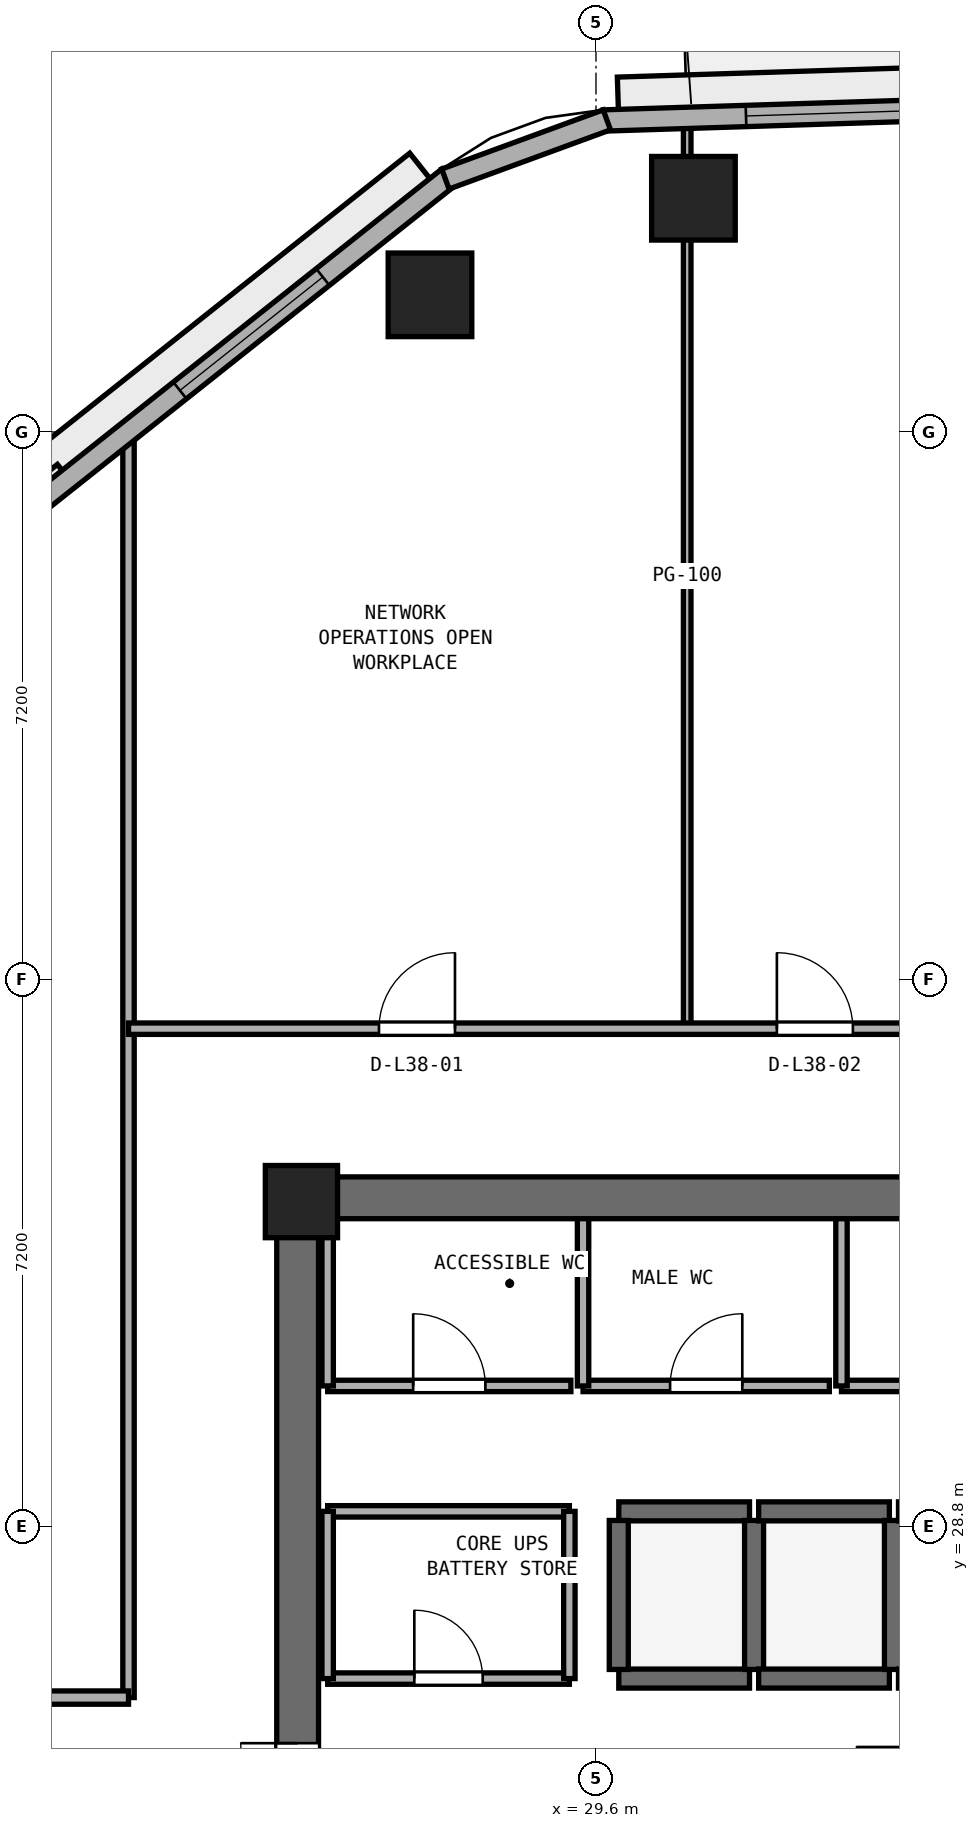
"""IFC4 building model, lengths in metres.
Left out: names, types, materials, properties, quantities, classifications, styles, units other than length and angle.
Written with IfcOpenShell. Run it as: python <this file> out.ifc"""

import sys

from ifc_helpers import new_model, si_unit, direction, frame, frame_2d, origin, origin_2d, place, context, subcontext, project, spatial, rectangle, extrude, element, fill, save


model = new_model("IFC4")
c1 = context("Model", 3, precision=1e-05, world=origin(), true_north=direction((0.0, 1.0)))
c2 = subcontext(c1, "Body", "Model", "MODEL_VIEW")
j1 = project(units=[si_unit("LENGTHUNIT", "METRE"), si_unit("PLANEANGLEUNIT", "RADIAN")], contexts=[c1])
p1 = place(None, origin())
s1 = spatial("IfcSite", under=j1, at=p1, CompositionType="ELEMENT")
p2 = place(p1, origin())
s2 = spatial("IfcBuilding", under=s1, at=p2, CompositionType="ELEMENT")
p3 = place(p2, frame((0.0, 0.0, 151.6)))
s3 = spatial("IfcBuildingStorey", under=s2, at=p3, CompositionType="ELEMENT", Elevation=151.6)
p4 = place(p3, frame((25.4, 33.125, 0.0), z_axis=(0.0, 0.0, 1.0), x_axis=(1.0, 0.0, 0.0)))
e1 = element("IfcWall", 1, at=p4, inside=s3, PredefinedType="SHEAR", context=c2, shape_type="SweptSolid", body=[
    extrude(rectangle(XDim=23.2, YDim=0.55, at=frame_2d((11.6, 0.0))), origin(), (0.0, 0.0, 1.0), 3.54),
])
p5 = place(p3, frame((25.675, 17.55, 0.0), z_axis=(0.0, 0.0, 1.0), x_axis=(0.0, 1.0, 0.0)))
e2 = element("IfcWall", 2, at=p5, inside=s3, PredefinedType="SHEAR", context=c2, shape_type="SweptSolid", body=[
    extrude(rectangle(XDim=15.3, YDim=0.55, at=frame_2d((7.65, 0.0))), origin(), (0.0, 0.0, 1.0), 3.54),
])
p6 = place(p5, frame((6.9, 0.0, 0.0)))
e3 = element("IfcOpeningElement", 3, at=p6, cuts=e2, PredefinedType="OPENING", context=c2, shape_type="SweptSolid", body=[
    extrude(rectangle(XDim=1.5, YDim=2.15, at=frame_2d((0.75, 1.075))), frame((0.0, 0.285, 0.0), z_axis=(0.0, -1.0, 0.0), x_axis=(1.0, 0.0, 0.0)), (0.0, 0.0, 1.0), 0.57),
])
p7 = place(p3, frame((25.725, 33.075, 0.0), z_axis=(0.0, 0.0, 1.0), x_axis=(1.0, 0.0, 0.0)))
e4 = element("IfcColumn", 4, at=p7, inside=s3, PredefinedType="PILASTER", context=c2, shape_type="SweptSolid", body=[
    extrude(rectangle(XDim=0.95, YDim=0.95, at=origin_2d()), origin(), (0.0, 0.0, 1.0), 3.8),
])
for number, where, z_axis, x_axis in (
    (5, (30.882, 46.275, 0.0), (0.0, 0.0, 1.0), (1.0, 0.0, 0.0)),
    (6, (27.416, 45.004, 0.0), (0.0, 0.0, 1.0), (1.0, 0.0, 0.0)),
):
    element("IfcColumn", number, at=place(p3, frame(where, z_axis=z_axis, x_axis=x_axis)), inside=s3, PredefinedType="COLUMN", context=c2, shape_type="SweptSolid", body=[
        extrude(rectangle(XDim=1.1, YDim=1.1, at=origin_2d()), origin(), (0.0, 0.0, 1.0), 3.8),
    ])
for number, where, z_axis, x_axis in (
    (7, (29.9, 26.8, 0.0), (0.0, 0.0, 1.0), (1.0, 0.0, 0.0)),
    (8, (29.9, 29.0, 0.0), (0.0, 0.0, 1.0), (1.0, 0.0, 0.0)),
):
    element("IfcWall", number, at=place(p3, frame(where, z_axis=z_axis, x_axis=x_axis)), inside=s3, PredefinedType="SHEAR", context=c2, shape_type="SweptSolid", body=[
        extrude(rectangle(XDim=1.72, YDim=0.25, at=frame_2d((0.86, 0.0))), origin(), (0.0, 0.0, 1.0), 3.54),
    ])
for number, where, z_axis, x_axis in (
    (9, (29.9, 26.92, 0.0), (0.0, 0.0, 1.0), (0.0, 1.0, 0.0)),
    (10, (31.68, 26.92, 0.0), (0.0, 0.0, 1.0), (0.0, 1.0, 0.0)),
):
    element("IfcWall", number, at=place(p3, frame(where, z_axis=z_axis, x_axis=x_axis)), inside=s3, PredefinedType="SHEAR", context=c2, shape_type="SweptSolid", body=[
        extrude(rectangle(XDim=1.96, YDim=0.25, at=frame_2d((0.98, 0.0))), origin(), (0.0, 0.0, 1.0), 3.54),
    ])
for number, where, z_axis, x_axis in (
    (11, (31.74, 26.8, 0.0), (0.0, 0.0, 1.0), (1.0, 0.0, 0.0)),
    (12, (31.74, 29.0, 0.0), (0.0, 0.0, 1.0), (1.0, 0.0, 0.0)),
):
    element("IfcWall", number, at=place(p3, frame(where, z_axis=z_axis, x_axis=x_axis)), inside=s3, PredefinedType="SHEAR", context=c2, shape_type="SweptSolid", body=[
        extrude(rectangle(XDim=1.72, YDim=0.25, at=frame_2d((0.86, 0.0))), origin(), (0.0, 0.0, 1.0), 3.54),
    ])
p8 = place(p3, frame((33.52, 26.92, 0.0), z_axis=(0.0, 0.0, 1.0), x_axis=(0.0, 1.0, 0.0)))
e13 = element("IfcWall", 13, at=p8, inside=s3, PredefinedType="SHEAR", context=c2, shape_type="SweptSolid", body=[
    extrude(rectangle(XDim=1.96, YDim=0.25, at=frame_2d((0.98, 0.0))), origin(), (0.0, 0.0, 1.0), 3.54),
])
for number, where, z_axis, x_axis in (
    (14, (33.58, 26.8, 0.0), (0.0, 0.0, 1.0), (1.0, 0.0, 0.0)),
    (15, (33.58, 29.0, 0.0), (0.0, 0.0, 1.0), (1.0, 0.0, 0.0)),
):
    element("IfcWall", number, at=place(p3, frame(where, z_axis=z_axis, x_axis=x_axis)), inside=s3, PredefinedType="SHEAR", context=c2, shape_type="SweptSolid", body=[
        extrude(rectangle(XDim=1.72, YDim=0.25, at=frame_2d((0.86, 0.0))), origin(), (0.0, 0.0, 1.0), 3.54),
    ])
p9 = place(p3, frame((26.07, 30.65, 0.0), z_axis=(0.0, 0.0, 1.0), x_axis=(1.0, 0.0, 0.0)))
e16 = element("IfcWall", 16, at=p9, inside=s3, PredefinedType="PARTITIONING", context=c2, shape_type="SweptSolid", body=[
    extrude(rectangle(XDim=3.2, YDim=0.15, at=frame_2d((1.6, 0.0))), origin(), (0.0, 0.0, 1.0), 3.54),
])
p10 = place(p9, frame((1.125, 0.0, 0.0)))
e17 = element("IfcOpeningElement", 17, at=p10, cuts=e16, PredefinedType="OPENING", context=c2, shape_type="SweptSolid", body=[
    extrude(rectangle(XDim=0.95, YDim=2.1, at=frame_2d((0.475, 1.05))), frame((0.0, 0.085, 0.0), z_axis=(0.0, -1.0, 0.0), x_axis=(1.0, 0.0, 0.0)), (0.0, 0.0, 1.0), 0.17),
])
p11 = place(p3, frame((26.07, 30.65, 0.0), z_axis=(0.0, 0.0, 1.0), x_axis=(0.0, 1.0, 0.0)))
e18 = element("IfcWall", 18, at=p11, inside=s3, PredefinedType="PARTITIONING", context=c2, shape_type="SweptSolid", body=[
    extrude(rectangle(XDim=2.2, YDim=0.15, at=frame_2d((1.1, 0.0))), origin(), (0.0, 0.0, 1.0), 2.64),
])
p12 = place(p3, frame((29.43, 30.65, 0.0), z_axis=(0.0, 0.0, 1.0), x_axis=(1.0, 0.0, 0.0)))
e19 = element("IfcWall", 19, at=p12, inside=s3, PredefinedType="PARTITIONING", context=c2, shape_type="SweptSolid", body=[
    extrude(rectangle(XDim=3.24, YDim=0.15, at=frame_2d((1.62, 0.0))), origin(), (0.0, 0.0, 1.0), 3.54),
])
p13 = place(p12, frame((1.145, 0.0, 0.0)))
e20 = element("IfcOpeningElement", 20, at=p13, cuts=e19, PredefinedType="OPENING", context=c2, shape_type="SweptSolid", body=[
    extrude(rectangle(XDim=0.95, YDim=2.1, at=frame_2d((0.475, 1.05))), frame((0.0, 0.085, 0.0), z_axis=(0.0, -1.0, 0.0), x_axis=(1.0, 0.0, 0.0)), (0.0, 0.0, 1.0), 0.17),
])
p14 = place(p3, frame((29.43, 30.65, 0.0), z_axis=(0.0, 0.0, 1.0), x_axis=(0.0, 1.0, 0.0)))
e21 = element("IfcWall", 21, at=p14, inside=s3, PredefinedType="PARTITIONING", context=c2, shape_type="SweptSolid", body=[
    extrude(rectangle(XDim=2.2, YDim=0.15, at=frame_2d((1.1, 0.0))), origin(), (0.0, 0.0, 1.0), 3.54),
])
p15 = place(p3, frame((32.83, 30.65, 0.0), z_axis=(0.0, 0.0, 1.0), x_axis=(1.0, 0.0, 0.0)))
e22 = element("IfcWall", 22, at=p15, inside=s3, PredefinedType="PARTITIONING", context=c2, shape_type="SweptSolid", body=[
    extrude(rectangle(XDim=4.02, YDim=0.15, at=frame_2d((2.01, 0.0))), origin(), (0.0, 0.0, 1.0), 3.54),
])
p16 = place(p15, frame((1.56, 0.0, 0.0)))
e23 = element("IfcOpeningElement", 23, at=p16, cuts=e22, PredefinedType="OPENING", context=c2, shape_type="SweptSolid", body=[
    extrude(rectangle(XDim=0.9, YDim=2.1, at=frame_2d((0.45, 1.05))), frame((0.0, 0.085, 0.0), z_axis=(0.0, -1.0, 0.0), x_axis=(1.0, 0.0, 0.0)), (0.0, 0.0, 1.0), 0.17),
])
p17 = place(p3, frame((32.83, 30.65, 0.0), z_axis=(0.0, 0.0, 1.0), x_axis=(0.0, 1.0, 0.0)))
e24 = element("IfcWall", 24, at=p17, inside=s3, PredefinedType="PARTITIONING", context=c2, shape_type="SweptSolid", body=[
    extrude(rectangle(XDim=2.2, YDim=0.15, at=frame_2d((1.1, 0.0))), origin(), (0.0, 0.0, 1.0), 3.54),
])
p18 = place(p3, frame((26.07, 26.8, 0.0), z_axis=(0.0, 0.0, 1.0), x_axis=(1.0, 0.0, 0.0)))
e25 = element("IfcWall", 25, at=p18, inside=s3, PredefinedType="PARTITIONING", context=c2, shape_type="SweptSolid", body=[
    extrude(rectangle(XDim=3.18, YDim=0.15, at=frame_2d((1.59, 0.0))), origin(), (0.0, 0.0, 1.0), 3.54),
])
p19 = place(p18, frame((1.14, 0.0, 0.0)))
e26 = element("IfcOpeningElement", 26, at=p19, cuts=e25, PredefinedType="OPENING", context=c2, shape_type="SweptSolid", body=[
    extrude(rectangle(XDim=0.9, YDim=2.1, at=frame_2d((0.45, 1.05))), frame((0.0, 0.085, 0.0), z_axis=(0.0, -1.0, 0.0), x_axis=(1.0, 0.0, 0.0)), (0.0, 0.0, 1.0), 0.17),
])
p20 = place(p3, frame((26.07, 29.0, 0.0), z_axis=(0.0, 0.0, 1.0), x_axis=(1.0, 0.0, 0.0)))
e27 = element("IfcWall", 27, at=p20, inside=s3, PredefinedType="PARTITIONING", context=c2, shape_type="SweptSolid", body=[
    extrude(rectangle(XDim=3.18, YDim=0.15, at=frame_2d((1.59, 0.0))), origin(), (0.0, 0.0, 1.0), 3.54),
])
p21 = place(p3, frame((26.07, 26.8, 0.0), z_axis=(0.0, 0.0, 1.0), x_axis=(0.0, 1.0, 0.0)))
e28 = element("IfcWall", 28, at=p21, inside=s3, PredefinedType="PARTITIONING", context=c2, shape_type="SweptSolid", body=[
    extrude(rectangle(XDim=2.2, YDim=0.15, at=frame_2d((1.1, 0.0))), origin(), (0.0, 0.0, 1.0), 2.64),
])
p22 = place(p3, frame((29.25, 26.8, 0.0), z_axis=(0.0, 0.0, 1.0), x_axis=(0.0, 1.0, 0.0)))
e29 = element("IfcWall", 29, at=p22, inside=s3, PredefinedType="PARTITIONING", context=c2, shape_type="SweptSolid", body=[
    extrude(rectangle(XDim=2.2, YDim=0.15, at=frame_2d((1.1, 0.0))), origin(), (0.0, 0.0, 1.0), 3.54),
])
p23 = place(p3, frame((30.8, 35.35, 0.0), z_axis=(0.0, 0.0, 1.0), x_axis=(0.0, 1.0, 0.0)))
e30 = element("IfcWall", 30, at=p23, inside=s3, PredefinedType="PARTITIONING", context=c2, shape_type="SweptSolid", body=[
    extrude(rectangle(XDim=11.918, YDim=0.1, at=frame_2d((5.959, 0.0))), origin(), (0.0, 0.0, 1.0), 2.923),
])
p24 = place(p3, frame((23.45, 26.55, 0.0), z_axis=(0.0, 0.0, 1.0), x_axis=(0.0, 1.0, 0.0)))
e31 = element("IfcWall", 31, at=p24, inside=s3, PredefinedType="PARTITIONING", context=c2, shape_type="SweptSolid", body=[
    extrude(rectangle(XDim=16.698, YDim=0.15, at=frame_2d((8.349, 0.0))), origin(), (0.0, 0.0, 1.0), 3.54),
])
p25 = place(p3, frame((13.605, 26.55, 0.0), z_axis=(0.0, 0.0, 1.0), x_axis=(1.0, 0.0, 0.0)))
e32 = element("IfcWall", 32, at=p25, inside=s3, PredefinedType="PARTITIONING", context=c2, shape_type="SweptSolid", body=[
    extrude(rectangle(XDim=9.845, YDim=0.175, at=frame_2d((4.922, 0.0))), origin(), (0.0, 0.0, 1.0), 3.54),
])
p26 = place(p25, frame((4.472, 0.0, 0.0)))
e33 = element("IfcOpeningElement", 33, at=p26, cuts=e32, PredefinedType="OPENING", context=c2, shape_type="SweptSolid", body=[
    extrude(rectangle(XDim=0.9, YDim=2.1, at=frame_2d((0.45, 1.05))), frame((0.0, 0.097, 0.0), z_axis=(0.0, -1.0, 0.0), x_axis=(1.0, 0.0, 0.0)), (0.0, 0.0, 1.0), 0.195),
])
p27 = place(p3, frame((23.45, 35.35, 0.0), z_axis=(0.0, 0.0, 1.0), x_axis=(1.0, 0.0, 0.0)))
e34 = element("IfcWall", 34, at=p27, inside=s3, PredefinedType="PARTITIONING", context=c2, shape_type="SweptSolid", body=[
    extrude(rectangle(XDim=10.95, YDim=0.15, at=frame_2d((5.475, 0.0))), origin(), (0.0, 0.0, 1.0), 3.54),
])
p28 = place(p27, frame((3.295, 0.0, 0.0)))
e35 = element("IfcOpeningElement", 35, at=p28, cuts=e34, PredefinedType="OPENING", context=c2, shape_type="SweptSolid", body=[
    extrude(rectangle(XDim=1.0, YDim=2.12, at=frame_2d((0.5, 1.06))), frame((0.0, 0.085, 0.0), z_axis=(0.0, -1.0, 0.0), x_axis=(1.0, 0.0, 0.0)), (0.0, 0.0, 1.0), 0.17),
])
p29 = place(p27, frame((8.53, 0.0, 0.0)))
e36 = element("IfcOpeningElement", 36, at=p29, cuts=e34, PredefinedType="OPENING", context=c2, shape_type="SweptSolid", body=[
    extrude(rectangle(XDim=1.0, YDim=2.12, at=frame_2d((0.5, 1.06))), frame((0.0, 0.085, 0.0), z_axis=(0.0, -1.0, 0.0), x_axis=(1.0, 0.0, 0.0)), (0.0, 0.0, 1.0), 0.17),
])
p30 = place(p3, frame((46.143, 47.82, 0.0), z_axis=(0.0, 0.0, 1.0), x_axis=(-0.999497065256, -0.031711457627, 0.0)))
e37 = element("IfcWall", 37, at=p30, inside=s3, PredefinedType="STANDARD", context=c2, shape_type="SweptSolid", body=[
    extrude(rectangle(XDim=16.452, YDim=0.28, at=frame_2d((8.226, 0.0))), origin(), (0.0, 0.0, 1.0), 3.54),
])
p31 = place(p30, frame((7.676, 0.0, 0.0)))
e38 = element("IfcOpeningElement", 38, at=p31, cuts=e37, PredefinedType="OPENING", context=c2, shape_type="SweptSolid", body=[
    extrude(rectangle(XDim=1.1, YDim=2.2, at=frame_2d((0.55, 1.1))), frame((0.0, 0.15, 0.0), z_axis=(0.0, -1.0, 0.0), x_axis=(1.0, 0.0, 0.0)), (0.0, 0.0, 1.0), 0.3),
])
p32 = place(p30, frame((1.875, 0.0, 0.9)))
e39 = element("IfcOpeningElement", 39, at=p32, cuts=e37, PredefinedType="OPENING", context=c2, shape_type="SweptSolid", body=[
    extrude(rectangle(XDim=2.4, YDim=1.75, at=frame_2d((1.2, 0.875))), frame((0.0, 0.15, 0.0), z_axis=(0.0, -1.0, 0.0), x_axis=(1.0, 0.0, 0.0)), (0.0, 0.0, 1.0), 0.3),
])
p33 = place(p30, frame((12.177, 0.0, 0.9)))
e40 = element("IfcOpeningElement", 40, at=p33, cuts=e37, PredefinedType="OPENING", context=c2, shape_type="SweptSolid", body=[
    extrude(rectangle(XDim=2.4, YDim=1.75, at=frame_2d((1.2, 0.875))), frame((0.0, 0.15, 0.0), z_axis=(0.0, -1.0, 0.0), x_axis=(1.0, 0.0, 0.0)), (0.0, 0.0, 1.0), 0.3),
])
p34 = place(p3, frame((27.658, 46.55, 0.0), z_axis=(0.0, 0.0, 1.0), x_axis=(-0.783266285861, -0.621686356158, 0.0)))
e41 = element("IfcWall", 41, at=p34, inside=s3, PredefinedType="STANDARD", context=c2, shape_type="SweptSolid", body=[
    extrude(rectangle(XDim=16.353, YDim=0.28, at=frame_2d((8.177, 0.0))), origin(), (0.0, 0.0, 1.0), 3.54),
])
p35 = place(p34, frame((2.109, 0.0, 0.9)))
e42 = element("IfcOpeningElement", 42, at=p35, cuts=e41, PredefinedType="OPENING", context=c2, shape_type="SweptSolid", body=[
    extrude(rectangle(XDim=2.4, YDim=1.75, at=frame_2d((1.2, 0.875))), frame((0.0, 0.15, 0.0), z_axis=(0.0, -1.0, 0.0), x_axis=(1.0, 0.0, 0.0)), (0.0, 0.0, 1.0), 0.3),
])
p36 = place(p34, frame((6.977, 0.0, 0.9)))
e43 = element("IfcOpeningElement", 43, at=p36, cuts=e41, PredefinedType="OPENING", context=c2, shape_type="SweptSolid", body=[
    extrude(rectangle(XDim=2.4, YDim=1.75, at=frame_2d((1.2, 0.875))), frame((0.0, 0.15, 0.0), z_axis=(0.0, -1.0, 0.0), x_axis=(1.0, 0.0, 0.0)), (0.0, 0.0, 1.0), 0.3),
])
p37 = place(p34, frame((11.844, 0.0, 0.9)))
e44 = element("IfcOpeningElement", 44, at=p37, cuts=e41, PredefinedType="OPENING", context=c2, shape_type="SweptSolid", body=[
    extrude(rectangle(XDim=2.4, YDim=1.75, at=frame_2d((1.2, 0.875))), frame((0.0, 0.15, 0.0), z_axis=(0.0, -1.0, 0.0), x_axis=(1.0, 0.0, 0.0)), (0.0, 0.0, 1.0), 0.3),
])
p38 = place(p3, frame((29.743, 47.306, 0.0), z_axis=(0.0, 0.0, 1.0), x_axis=(-0.93893328381, -0.344099242302, 0.0)))
e45 = element("IfcWall", 45, at=p38, inside=s3, PredefinedType="STANDARD", context=c2, shape_type="SweptSolid", body=[
    extrude(rectangle(XDim=2.262, YDim=0.28, at=frame_2d((1.131, 0.0))), origin(), (0.0, 0.0, 1.0), 3.54),
])
p39 = place(p6, origin())
e46 = element("IfcDoor", 46, at=p39, inside=s3, OperationType="DOUBLE_DOOR_SINGLE_SWING", PredefinedType="DOOR", context=c2, shape_type="SweptSolid", body=[
    extrude(rectangle(XDim=1.5, YDim=2.15, at=frame_2d((0.75, 1.075))), frame((0.0, 0.025, 0.0), z_axis=(0.0, -1.0, 0.0), x_axis=(1.0, 0.0, 0.0)), (0.0, 0.0, 1.0), 0.05),
])
fill(e3, e46)
p40 = place(p10, origin())
e47 = element("IfcDoor", 47, at=p40, inside=s3, OperationType="SINGLE_SWING_LEFT", PredefinedType="DOOR", context=c2, shape_type="SweptSolid", body=[
    extrude(rectangle(XDim=0.95, YDim=2.1, at=frame_2d((0.475, 1.05))), frame((0.0, 0.025, 0.0), z_axis=(0.0, -1.0, 0.0), x_axis=(1.0, 0.0, 0.0)), (0.0, 0.0, 1.0), 0.05),
])
fill(e17, e47)
p41 = place(p13, origin())
e48 = element("IfcDoor", 48, at=p41, inside=s3, OperationType="SINGLE_SWING_RIGHT", PredefinedType="DOOR", context=c2, shape_type="SweptSolid", body=[
    extrude(rectangle(XDim=0.95, YDim=2.1, at=frame_2d((0.475, 1.05))), frame((0.0, 0.025, 0.0), z_axis=(0.0, -1.0, 0.0), x_axis=(1.0, 0.0, 0.0)), (0.0, 0.0, 1.0), 0.05),
])
fill(e20, e48)
p42 = place(p19, origin())
e49 = element("IfcDoor", 49, at=p42, inside=s3, OperationType="SINGLE_SWING_LEFT", PredefinedType="DOOR", context=c2, shape_type="SweptSolid", body=[
    extrude(rectangle(XDim=0.9, YDim=2.1, at=frame_2d((0.45, 1.05))), frame((0.0, 0.025, 0.0), z_axis=(0.0, -1.0, 0.0), x_axis=(1.0, 0.0, 0.0)), (0.0, 0.0, 1.0), 0.05),
])
fill(e26, e49)
p43 = place(p28, origin())
e50 = element("IfcDoor", 50, at=p43, inside=s3, OperationType="SINGLE_SWING_RIGHT", PredefinedType="DOOR", context=c2, shape_type="SweptSolid", body=[
    extrude(rectangle(XDim=1.0, YDim=2.12, at=frame_2d((0.5, 1.06))), frame((0.0, 0.025, 0.0), z_axis=(0.0, -1.0, 0.0), x_axis=(1.0, 0.0, 0.0)), (0.0, 0.0, 1.0), 0.05),
])
fill(e35, e50)
p44 = place(p29, origin())
e51 = element("IfcDoor", 51, at=p44, inside=s3, OperationType="SINGLE_SWING_LEFT", PredefinedType="DOOR", context=c2, shape_type="SweptSolid", body=[
    extrude(rectangle(XDim=1.0, YDim=2.12, at=frame_2d((0.5, 1.06))), frame((0.0, 0.025, 0.0), z_axis=(0.0, -1.0, 0.0), x_axis=(1.0, 0.0, 0.0)), (0.0, 0.0, 1.0), 0.05),
])
fill(e36, e51)
p45 = place(p33, origin())
e52 = element("IfcWindow", 52, at=p45, inside=s3, PartitioningType="SINGLE_PANEL", PredefinedType="WINDOW", context=c2, shape_type="SweptSolid", body=[
    extrude(rectangle(XDim=2.4, YDim=1.75, at=frame_2d((1.2, 0.875))), frame((0.0, 0.03, 0.0), z_axis=(0.0, -1.0, 0.0), x_axis=(1.0, 0.0, 0.0)), (0.0, 0.0, 1.0), 0.06),
])
fill(e40, e52)
p46 = place(p35, origin())
e53 = element("IfcWindow", 53, at=p46, inside=s3, PartitioningType="SINGLE_PANEL", PredefinedType="WINDOW", context=c2, shape_type="SweptSolid", body=[
    extrude(rectangle(XDim=2.4, YDim=1.75, at=frame_2d((1.2, 0.875))), frame((0.0, 0.03, 0.0), z_axis=(0.0, -1.0, 0.0), x_axis=(1.0, 0.0, 0.0)), (0.0, 0.0, 1.0), 0.06),
])
fill(e42, e53)
save(model, sys.argv[1])
